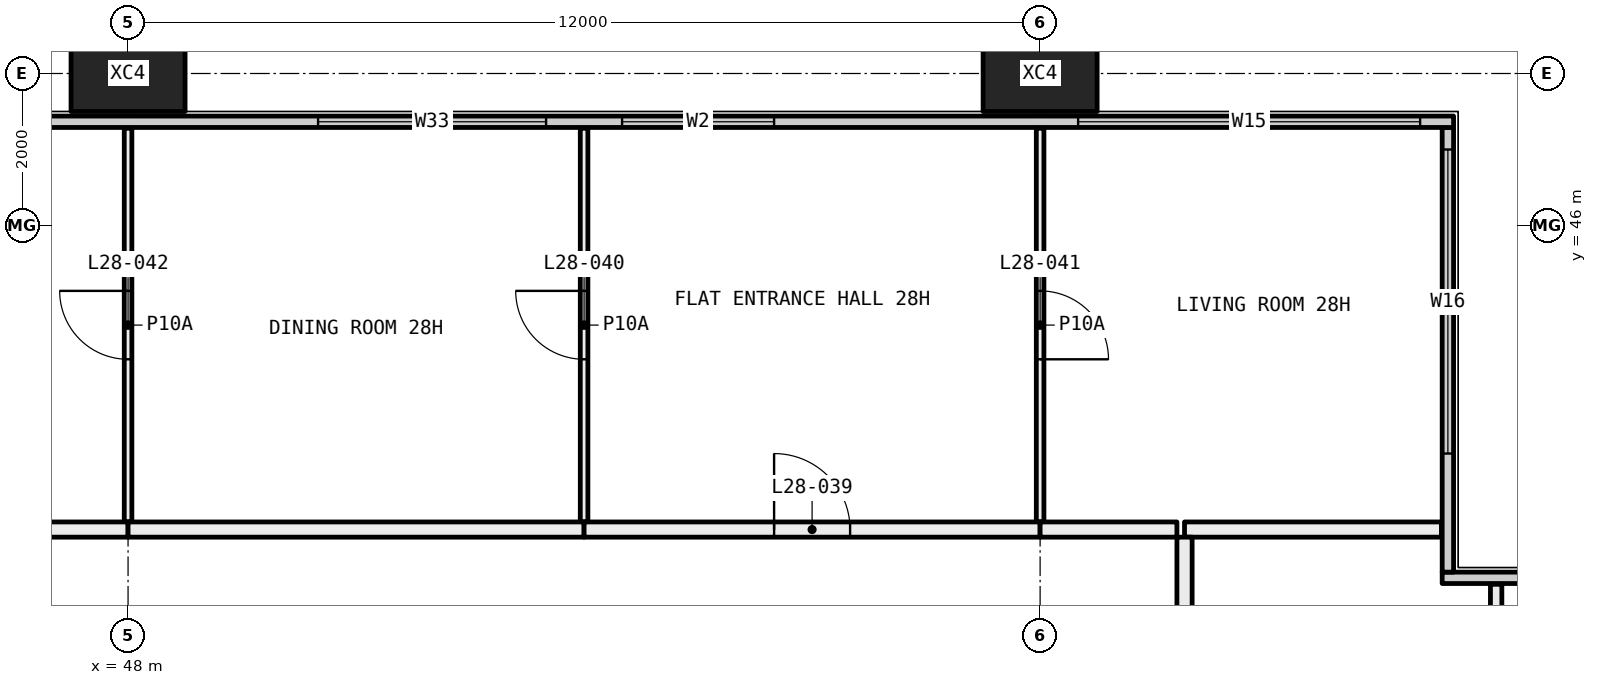
"""IFC4 building model, lengths in metres.
Left out: names, types, materials, properties, quantities, classifications, styles, units other than length and angle.
Written with IfcOpenShell. Run it as: python <this file> out.ifc"""

import sys

from ifc_helpers import new_model, si_unit, direction, frame, frame_2d, origin, origin_2d, place, context, subcontext, project, spatial, rectangle, hollow_rectangle, extrude, element, fill, save


model = new_model("IFC4")
c1 = context("Model", 3, precision=1e-05, world=origin(), true_north=direction((0.0, 1.0)))
c2 = subcontext(c1, "Body", "Model", "MODEL_VIEW")
j1 = project(units=[si_unit("LENGTHUNIT", "METRE"), si_unit("PLANEANGLEUNIT", "RADIAN")], contexts=[c1])
p1 = place(None, origin())
s1 = spatial("IfcSite", under=j1, at=p1, CompositionType="ELEMENT")
p2 = place(p1, origin())
s2 = spatial("IfcBuilding", under=s1, at=p2, CompositionType="ELEMENT")
p3 = place(p2, frame((0.0, 0.0, 110.4)))
s3 = spatial("IfcBuildingStorey", under=s2, at=p3, CompositionType="ELEMENT", Elevation=110.4)
for number, where, z_axis, x_axis in (
    (1, (48.0, 48.0, -0.4), (0.0, 0.0, 1.0), (1.0, 0.0, 0.0)),
    (2, (60.0, 48.0, -0.4), (0.0, 0.0, 1.0), (1.0, 0.0, 0.0)),
):
    element("IfcColumn", number, at=place(p3, frame(where, z_axis=z_axis, x_axis=x_axis)), inside=s3, PredefinedType="COLUMN", context=c2, shape_type="SweptSolid", body=[
        extrude(hollow_rectangle(XDim=1.5, YDim=1.0, WallThickness=0.06, at=origin_2d()), origin(), (0.0, 0.0, 1.0), 3.45),
    ])
p4 = place(p3, frame((65.29, 41.365, 0.0), z_axis=(0.0, 0.0, 1.0), x_axis=(1.0, 0.0, 0.0)))
e3 = element("IfcWall", 3, at=p4, inside=s3, PredefinedType="ELEMENTEDWALL", context=c2, shape_type="SweptSolid", body=[
    extrude(rectangle(XDim=6.15, YDim=0.15, at=frame_2d((3.075, 0.0))), origin(), (0.0, 0.0, 1.0), 3.05),
])
p5 = place(p4, frame((1.71, 0.0, 0.45)))
e4 = element("IfcOpeningElement", 4, at=p5, cuts=e3, PredefinedType="OPENING", context=c2, shape_type="SweptSolid", body=[
    extrude(rectangle(XDim=4.0, YDim=2.55, at=frame_2d((2.0, 1.275))), frame((0.0, 0.085, 0.0), z_axis=(0.0, -1.0, 0.0), x_axis=(1.0, 0.0, 0.0)), (0.0, 0.0, 1.0), 0.17),
])
p6 = place(p3, frame((65.365, 41.44, 0.0), z_axis=(0.0, 0.0, 1.0), x_axis=(0.0, 1.0, 0.0)))
e5 = element("IfcWall", 5, at=p6, inside=s3, PredefinedType="ELEMENTEDWALL", context=c2, shape_type="SweptSolid", body=[
    extrude(rectangle(XDim=5.85, YDim=0.15, at=frame_2d((2.925, 0.0))), origin(), (0.0, 0.0, 1.0), 3.05),
])
p7 = place(p6, frame((1.56, 0.0, 0.45)))
e6 = element("IfcOpeningElement", 6, at=p7, cuts=e5, PredefinedType="OPENING", context=c2, shape_type="SweptSolid", body=[
    extrude(rectangle(XDim=4.0, YDim=2.55, at=frame_2d((2.0, 1.275))), frame((0.0, 0.085, 0.0), z_axis=(0.0, -1.0, 0.0), x_axis=(1.0, 0.0, 0.0)), (0.0, 0.0, 1.0), 0.17),
])
p8 = place(p3, frame((6.56, 47.365, 0.0), z_axis=(0.0, 0.0, 1.0), x_axis=(1.0, 0.0, 0.0)))
e7 = element("IfcWall", 7, at=p8, inside=s3, PredefinedType="ELEMENTEDWALL", context=c2, shape_type="SweptSolid", body=[
    extrude(rectangle(XDim=58.88, YDim=0.15, at=frame_2d((29.44, 0.0))), origin(), (0.0, 0.0, 1.0), 3.05),
])
p9 = place(p8, frame((0.44, 0.0, 0.45)))
e8 = element("IfcOpeningElement", 8, at=p9, cuts=e7, PredefinedType="OPENING", context=c2, shape_type="SweptSolid", body=[
    extrude(rectangle(XDim=4.5, YDim=2.55, at=frame_2d((2.25, 1.275))), frame((0.0, 0.085, 0.0), z_axis=(0.0, -1.0, 0.0), x_axis=(1.0, 0.0, 0.0)), (0.0, 0.0, 1.0), 0.17),
])
p10 = place(p8, frame((7.94, 0.0, 0.45)))
e9 = element("IfcOpeningElement", 9, at=p10, cuts=e7, PredefinedType="OPENING", context=c2, shape_type="SweptSolid", body=[
    extrude(rectangle(XDim=3.0, YDim=2.55, at=frame_2d((1.5, 1.275))), frame((0.0, 0.085, 0.0), z_axis=(0.0, -1.0, 0.0), x_axis=(1.0, 0.0, 0.0)), (0.0, 0.0, 1.0), 0.17),
])
p11 = place(p8, frame((11.94, 0.0, 0.45)))
e10 = element("IfcOpeningElement", 10, at=p11, cuts=e7, PredefinedType="OPENING", context=c2, shape_type="SweptSolid", body=[
    extrude(rectangle(XDim=3.0, YDim=2.55, at=frame_2d((1.5, 1.275))), frame((0.0, 0.085, 0.0), z_axis=(0.0, -1.0, 0.0), x_axis=(1.0, 0.0, 0.0)), (0.0, 0.0, 1.0), 0.17),
])
p12 = place(p8, frame((19.94, 0.0, 0.45)))
e11 = element("IfcOpeningElement", 11, at=p12, cuts=e7, PredefinedType="OPENING", context=c2, shape_type="SweptSolid", body=[
    extrude(rectangle(XDim=3.0, YDim=2.55, at=frame_2d((1.5, 1.275))), frame((0.0, 0.085, 0.0), z_axis=(0.0, -1.0, 0.0), x_axis=(1.0, 0.0, 0.0)), (0.0, 0.0, 1.0), 0.17),
])
p13 = place(p8, frame((23.94, 0.0, 0.45)))
e12 = element("IfcOpeningElement", 12, at=p13, cuts=e7, PredefinedType="OPENING", context=c2, shape_type="SweptSolid", body=[
    extrude(rectangle(XDim=2.0, YDim=2.55, at=frame_2d((1.0, 1.275))), frame((0.0, 0.085, 0.0), z_axis=(0.0, -1.0, 0.0), x_axis=(1.0, 0.0, 0.0)), (0.0, 0.0, 1.0), 0.17),
])
p14 = place(p8, frame((31.94, 0.0, 0.45)))
e13 = element("IfcOpeningElement", 13, at=p14, cuts=e7, PredefinedType="OPENING", context=c2, shape_type="SweptSolid", body=[
    extrude(rectangle(XDim=3.0, YDim=2.55, at=frame_2d((1.5, 1.275))), frame((0.0, 0.085, 0.0), z_axis=(0.0, -1.0, 0.0), x_axis=(1.0, 0.0, 0.0)), (0.0, 0.0, 1.0), 0.17),
])
p15 = place(p8, frame((35.94, 0.0, 0.45)))
e14 = element("IfcOpeningElement", 14, at=p15, cuts=e7, PredefinedType="OPENING", context=c2, shape_type="SweptSolid", body=[
    extrude(rectangle(XDim=3.0, YDim=2.55, at=frame_2d((1.5, 1.275))), frame((0.0, 0.085, 0.0), z_axis=(0.0, -1.0, 0.0), x_axis=(1.0, 0.0, 0.0)), (0.0, 0.0, 1.0), 0.17),
])
p16 = place(p8, frame((43.94, 0.0, 0.45)))
e15 = element("IfcOpeningElement", 15, at=p16, cuts=e7, PredefinedType="OPENING", context=c2, shape_type="SweptSolid", body=[
    extrude(rectangle(XDim=3.0, YDim=2.55, at=frame_2d((1.5, 1.275))), frame((0.0, 0.085, 0.0), z_axis=(0.0, -1.0, 0.0), x_axis=(1.0, 0.0, 0.0)), (0.0, 0.0, 1.0), 0.17),
])
p17 = place(p8, frame((47.94, 0.0, 0.45)))
e16 = element("IfcOpeningElement", 16, at=p17, cuts=e7, PredefinedType="OPENING", context=c2, shape_type="SweptSolid", body=[
    extrude(rectangle(XDim=2.0, YDim=2.55, at=frame_2d((1.0, 1.275))), frame((0.0, 0.085, 0.0), z_axis=(0.0, -1.0, 0.0), x_axis=(1.0, 0.0, 0.0)), (0.0, 0.0, 1.0), 0.17),
])
p18 = place(p8, frame((53.94, 0.0, 0.45)))
e17 = element("IfcOpeningElement", 17, at=p18, cuts=e7, PredefinedType="OPENING", context=c2, shape_type="SweptSolid", body=[
    extrude(rectangle(XDim=4.5, YDim=2.55, at=frame_2d((2.25, 1.275))), frame((0.0, 0.085, 0.0), z_axis=(0.0, -1.0, 0.0), x_axis=(1.0, 0.0, 0.0)), (0.0, 0.0, 1.0), 0.17),
])
p19 = place(p3, frame((66.0, 41.28, 0.0), z_axis=(0.0, 0.0, 1.0), x_axis=(0.0, -1.0, 0.0)))
e18 = element("IfcWall", 18, at=p19, inside=s3, PredefinedType="PARTITIONING", context=c2, shape_type="SweptSolid", body=[
    extrude(rectangle(XDim=3.78, YDim=0.15, at=frame_2d((1.89, 0.0))), origin(), (0.0, 0.0, 1.0), 3.05),
])
p20 = place(p3, frame((65.28, 42.0, 0.0), z_axis=(0.0, 0.0, 1.0), x_axis=(-1.0, 0.0, 0.0)))
e19 = element("IfcWall", 19, at=p20, inside=s3, PredefinedType="PARTITIONING", context=c2, shape_type="SweptSolid", body=[
    extrude(rectangle(XDim=3.38, YDim=0.2, at=frame_2d((1.69, 0.0))), origin(), (0.0, 0.0, 1.0), 3.05),
])
p21 = place(p3, frame((61.9, 41.9, 0.0), z_axis=(0.0, 0.0, 1.0), x_axis=(0.0, -1.0, 0.0)))
e20 = element("IfcWall", 20, at=p21, inside=s3, PredefinedType="PARTITIONING", context=c2, shape_type="SweptSolid", body=[
    extrude(rectangle(XDim=4.4, YDim=0.2, at=frame_2d((2.2, 0.0))), origin(), (0.0, 0.0, 1.0), 3.05),
])
p22 = place(p3, frame((48.0, 42.1, 0.0), z_axis=(0.0, 0.0, 1.0), x_axis=(0.0, 1.0, 0.0)))
e21 = element("IfcWall", 21, at=p22, inside=s3, PredefinedType="PARTITIONING", context=c2, shape_type="SweptSolid", body=[
    extrude(rectangle(XDim=5.18, YDim=0.1, at=frame_2d((2.59, 0.0))), origin(), (0.0, 0.0, 1.0), 3.05),
])
p23 = place(p22, frame((2.14, 0.0, 0.0)))
e22 = element("IfcOpeningElement", 22, at=p23, cuts=e21, PredefinedType="OPENING", context=c2, shape_type="SweptSolid", body=[
    extrude(rectangle(XDim=0.9, YDim=2.1, at=frame_2d((0.45, 1.05))), frame((0.0, 0.06, 0.0), z_axis=(0.0, -1.0, 0.0), x_axis=(1.0, 0.0, 0.0)), (0.0, 0.0, 1.0), 0.12),
])
p24 = place(p3, frame((46.1, 42.0, 0.0), z_axis=(0.0, 0.0, 1.0), x_axis=(1.0, 0.0, 0.0)))
e23 = element("IfcWall", 23, at=p24, inside=s3, PredefinedType="PARTITIONING", context=c2, shape_type="SweptSolid", body=[
    extrude(rectangle(XDim=1.9, YDim=0.2, at=frame_2d((0.95, 0.0))), origin(), (0.0, 0.0, 1.0), 3.05),
])
p25 = place(p3, frame((54.0, 42.1, 0.0), z_axis=(0.0, 0.0, 1.0), x_axis=(0.0, 1.0, 0.0)))
e24 = element("IfcWall", 24, at=p25, inside=s3, PredefinedType="PARTITIONING", context=c2, shape_type="SweptSolid", body=[
    extrude(rectangle(XDim=5.18, YDim=0.1, at=frame_2d((2.59, 0.0))), origin(), (0.0, 0.0, 1.0), 3.05),
])
p26 = place(p25, frame((2.14, 0.0, 0.0)))
e25 = element("IfcOpeningElement", 25, at=p26, cuts=e24, PredefinedType="OPENING", context=c2, shape_type="SweptSolid", body=[
    extrude(rectangle(XDim=0.9, YDim=2.1, at=frame_2d((0.45, 1.05))), frame((0.0, 0.06, 0.0), z_axis=(0.0, -1.0, 0.0), x_axis=(1.0, 0.0, 0.0)), (0.0, 0.0, 1.0), 0.12),
])
p27 = place(p3, frame((48.0, 42.0, 0.0), z_axis=(0.0, 0.0, 1.0), x_axis=(1.0, 0.0, 0.0)))
e26 = element("IfcWall", 26, at=p27, inside=s3, PredefinedType="PARTITIONING", context=c2, shape_type="SweptSolid", body=[
    extrude(rectangle(XDim=6.0, YDim=0.2, at=frame_2d((3.0, 0.0))), origin(), (0.0, 0.0, 1.0), 3.05),
])
p28 = place(p3, frame((60.0, 42.1, 0.0), z_axis=(0.0, 0.0, 1.0), x_axis=(0.0, 1.0, 0.0)))
e27 = element("IfcWall", 27, at=p28, inside=s3, PredefinedType="PARTITIONING", context=c2, shape_type="SweptSolid", body=[
    extrude(rectangle(XDim=5.18, YDim=0.1, at=frame_2d((2.59, 0.0))), origin(), (0.0, 0.0, 1.0), 3.05),
])
p29 = place(p28, frame((2.14, 0.0, 0.0)))
e28 = element("IfcOpeningElement", 28, at=p29, cuts=e27, PredefinedType="OPENING", context=c2, shape_type="SweptSolid", body=[
    extrude(rectangle(XDim=0.9, YDim=2.1, at=frame_2d((0.45, 1.05))), frame((0.0, 0.06, 0.0), z_axis=(0.0, -1.0, 0.0), x_axis=(1.0, 0.0, 0.0)), (0.0, 0.0, 1.0), 0.12),
])
p30 = place(p3, frame((54.0, 42.0, 0.0), z_axis=(0.0, 0.0, 1.0), x_axis=(1.0, 0.0, 0.0)))
e29 = element("IfcWall", 29, at=p30, inside=s3, PredefinedType="PARTITIONING", context=c2, shape_type="SweptSolid", body=[
    extrude(rectangle(XDim=6.0, YDim=0.2, at=frame_2d((3.0, 0.0))), origin(), (0.0, 0.0, 1.0), 3.05),
])
p31 = place(p30, frame((2.5, 0.0, 0.0)))
e30 = element("IfcOpeningElement", 30, at=p31, cuts=e29, PredefinedType="OPENING", context=c2, shape_type="SweptSolid", body=[
    extrude(rectangle(XDim=1.0, YDim=2.1, at=frame_2d((0.5, 1.05))), frame((0.0, 0.11, 0.0), z_axis=(0.0, -1.0, 0.0), x_axis=(1.0, 0.0, 0.0)), (0.0, 0.0, 1.0), 0.22),
])
p32 = place(p3, frame((60.0, 42.0, 0.0), z_axis=(0.0, 0.0, 1.0), x_axis=(1.0, 0.0, 0.0)))
e31 = element("IfcWall", 31, at=p32, inside=s3, PredefinedType="PARTITIONING", context=c2, shape_type="SweptSolid", body=[
    extrude(rectangle(XDim=1.8, YDim=0.2, at=frame_2d((0.9, 0.0))), origin(), (0.0, 0.0, 1.0), 3.05),
])
p33 = place(p7, origin())
e32 = element("IfcWindow", 32, at=p33, inside=s3, PartitioningType="SINGLE_PANEL", PredefinedType="WINDOW", context=c2, shape_type="SweptSolid", body=[
    extrude(rectangle(XDim=4.0, YDim=2.55, at=frame_2d((2.0, 1.275))), frame((0.0, 0.03, 0.0), z_axis=(0.0, -1.0, 0.0), x_axis=(1.0, 0.0, 0.0)), (0.0, 0.0, 1.0), 0.06),
])
fill(e6, e32)
p34 = place(p16, origin())
e33 = element("IfcWindow", 33, at=p34, inside=s3, PartitioningType="SINGLE_PANEL", PredefinedType="WINDOW", context=c2, shape_type="SweptSolid", body=[
    extrude(rectangle(XDim=3.0, YDim=2.55, at=frame_2d((1.5, 1.275))), frame((0.0, 0.03, 0.0), z_axis=(0.0, -1.0, 0.0), x_axis=(1.0, 0.0, 0.0)), (0.0, 0.0, 1.0), 0.06),
])
fill(e15, e33)
p35 = place(p17, origin())
e34 = element("IfcWindow", 34, at=p35, inside=s3, PartitioningType="SINGLE_PANEL", PredefinedType="WINDOW", context=c2, shape_type="SweptSolid", body=[
    extrude(rectangle(XDim=2.0, YDim=2.55, at=frame_2d((1.0, 1.275))), frame((0.0, 0.03, 0.0), z_axis=(0.0, -1.0, 0.0), x_axis=(1.0, 0.0, 0.0)), (0.0, 0.0, 1.0), 0.06),
])
fill(e16, e34)
p36 = place(p18, origin())
e35 = element("IfcWindow", 35, at=p36, inside=s3, PartitioningType="SINGLE_PANEL", PredefinedType="WINDOW", context=c2, shape_type="SweptSolid", body=[
    extrude(rectangle(XDim=4.5, YDim=2.55, at=frame_2d((2.25, 1.275))), frame((0.0, 0.03, 0.0), z_axis=(0.0, -1.0, 0.0), x_axis=(1.0, 0.0, 0.0)), (0.0, 0.0, 1.0), 0.06),
])
fill(e17, e35)
p37 = place(p31, origin())
e36 = element("IfcDoor", 36, at=p37, inside=s3, OperationType="SINGLE_SWING_RIGHT", PredefinedType="DOOR", context=c2, shape_type="SweptSolid", body=[
    extrude(rectangle(XDim=1.0, YDim=2.1, at=frame_2d((0.5, 1.05))), frame((0.0, 0.025, 0.0), z_axis=(0.0, -1.0, 0.0), x_axis=(1.0, 0.0, 0.0)), (0.0, 0.0, 1.0), 0.05),
])
fill(e30, e36)
p38 = place(p26, origin())
e37 = element("IfcDoor", 37, at=p38, inside=s3, OperationType="SINGLE_SWING_LEFT", PredefinedType="DOOR", context=c2, shape_type="SweptSolid", body=[
    extrude(rectangle(XDim=0.9, YDim=2.1, at=frame_2d((0.45, 1.05))), frame((0.0, 0.025, 0.0), z_axis=(0.0, -1.0, 0.0), x_axis=(1.0, 0.0, 0.0)), (0.0, 0.0, 1.0), 0.05),
])
fill(e25, e37)
p39 = place(p29, frame((0.9, 0.0, 0.0), x_axis=(-1.0, 0.0, 0.0)))
e38 = element("IfcDoor", 38, at=p39, inside=s3, OperationType="SINGLE_SWING_LEFT", PredefinedType="DOOR", context=c2, shape_type="SweptSolid", body=[
    extrude(rectangle(XDim=0.9, YDim=2.1, at=frame_2d((0.45, 1.05))), frame((0.0, 0.025, 0.0), z_axis=(0.0, -1.0, 0.0), x_axis=(1.0, 0.0, 0.0)), (0.0, 0.0, 1.0), 0.05),
])
fill(e28, e38)
p40 = place(p23, origin())
e39 = element("IfcDoor", 39, at=p40, inside=s3, OperationType="SINGLE_SWING_LEFT", PredefinedType="DOOR", context=c2, shape_type="SweptSolid", body=[
    extrude(rectangle(XDim=0.9, YDim=2.1, at=frame_2d((0.45, 1.05))), frame((0.0, 0.025, 0.0), z_axis=(0.0, -1.0, 0.0), x_axis=(1.0, 0.0, 0.0)), (0.0, 0.0, 1.0), 0.05),
])
fill(e22, e39)
save(model, sys.argv[1])
